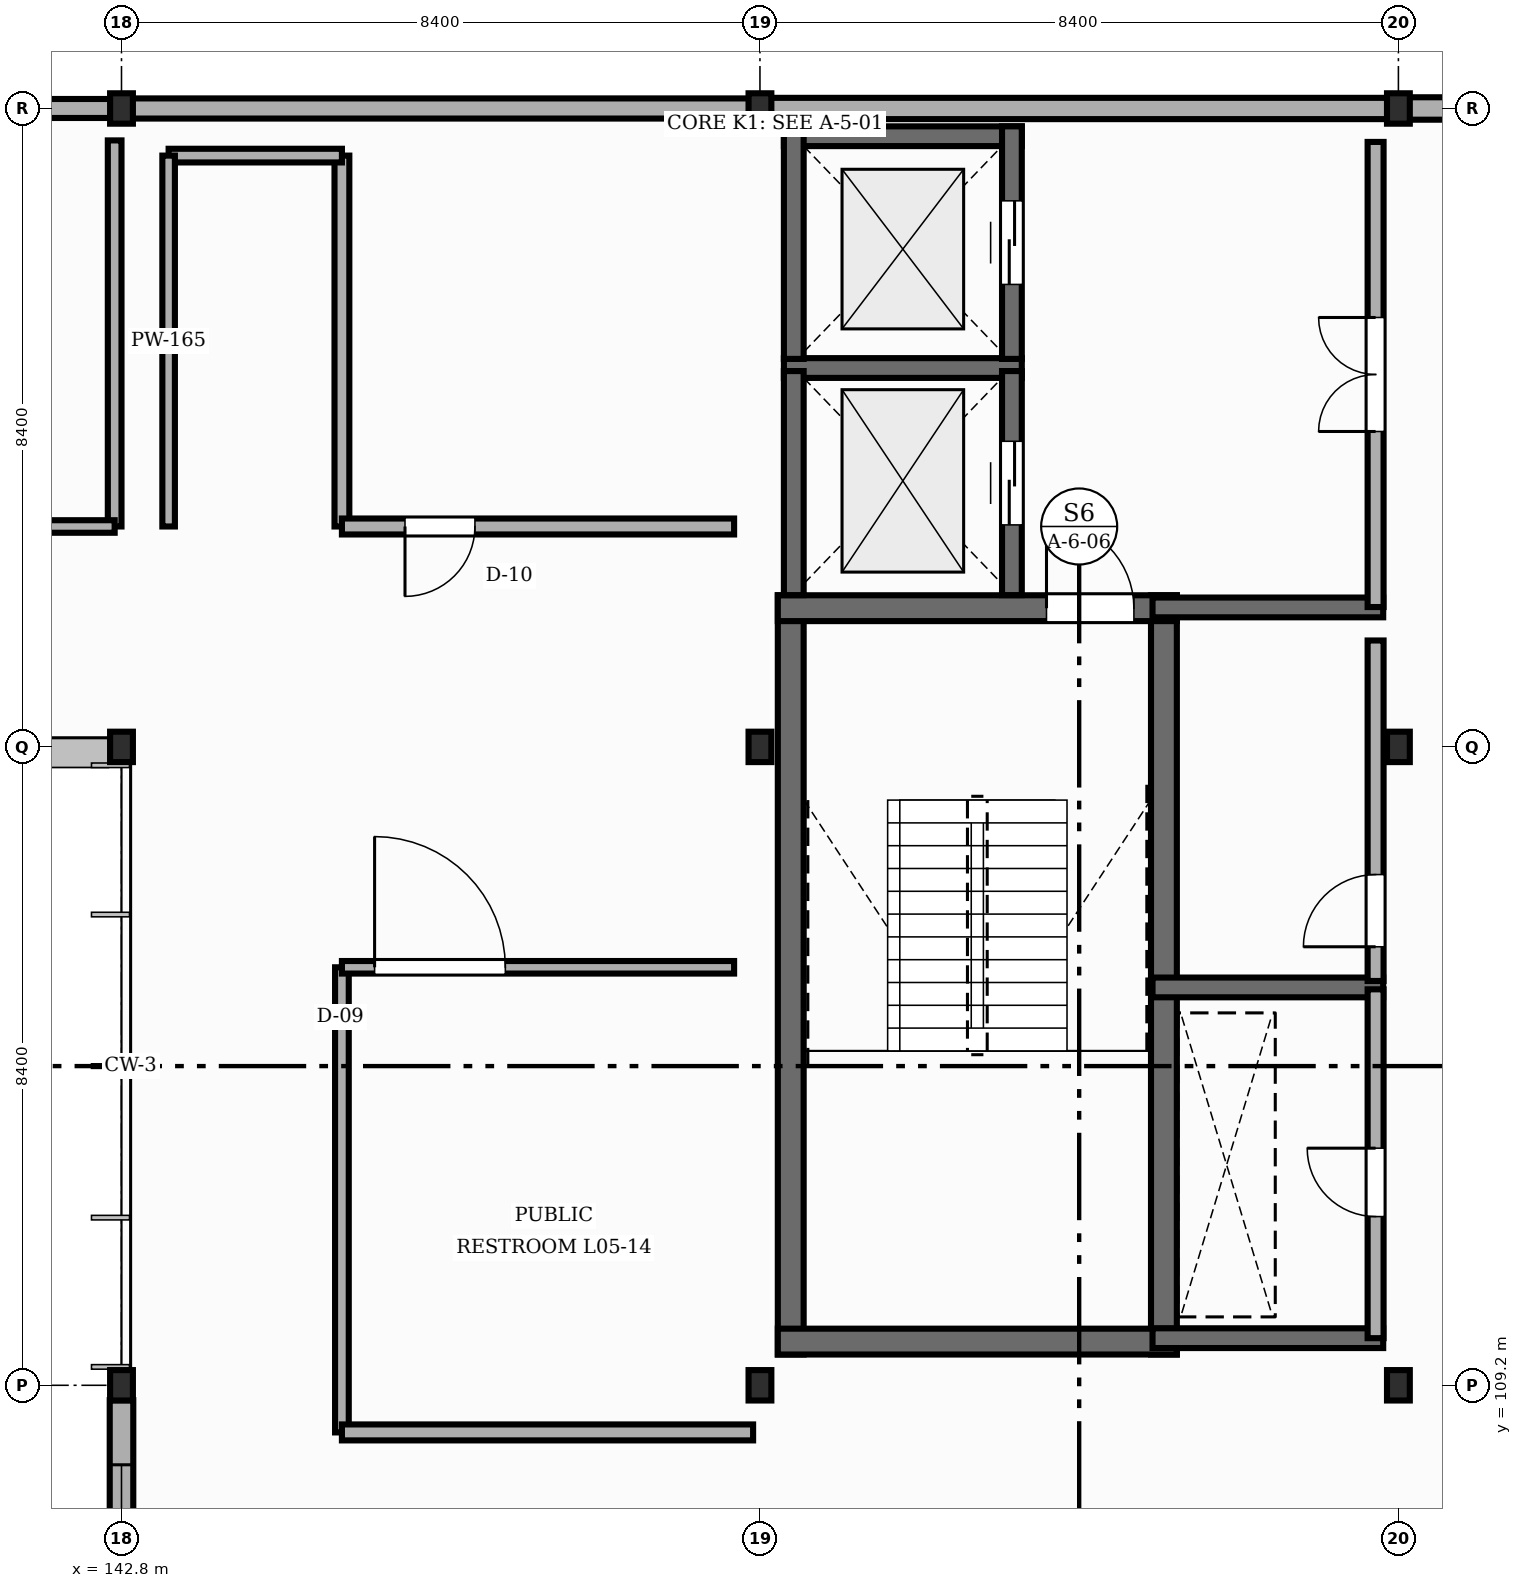
"""IFC4 building model, lengths in metres.
Left out: names, types, materials, properties, quantities, classifications, styles, units other than length and angle.
Written with IfcOpenShell. Run it as: python <this file> out.ifc"""

import sys

from ifc_helpers import new_model, si_unit, direction, frame, frame_2d, origin, origin_2d, place, context, subcontext, project, spatial, rectangle, i_section, extrude, element, fill, save


model = new_model("IFC4")
c1 = context("Model", 3, precision=1e-05, world=origin(), true_north=direction((0.0, 1.0)))
c2 = subcontext(c1, "Body", "Model", "MODEL_VIEW")
j1 = project(units=[si_unit("LENGTHUNIT", "METRE"), si_unit("PLANEANGLEUNIT", "RADIAN")], contexts=[c1])
p1 = place(None, origin())
s1 = spatial("IfcSite", under=j1, at=p1, CompositionType="ELEMENT")
p2 = place(p1, origin())
s2 = spatial("IfcBuilding", under=s1, at=p2, CompositionType="ELEMENT")
p3 = place(p2, frame((0.0, 0.0, 22.05)))
s3 = spatial("IfcBuildingStorey", under=s2, at=p3, CompositionType="ELEMENT", Elevation=22.05)
for number, where, z_axis, x_axis in (
    (1, (142.8, 109.2, 0.0), (0.0, 0.0, 1.0), (1.0, 0.0, 0.0)),
    (2, (142.8, 117.6, 0.0), (0.0, 0.0, 1.0), (1.0, 0.0, 0.0)),
    (3, (142.8, 126.0, 0.0), (0.0, 0.0, 1.0), (1.0, 0.0, 0.0)),
    (4, (151.2, 109.2, 0.0), (0.0, 0.0, 1.0), (1.0, 0.0, 0.0)),
    (5, (151.2, 117.6, 0.0), (0.0, 0.0, 1.0), (1.0, 0.0, 0.0)),
    (6, (151.2, 126.0, 0.0), (0.0, 0.0, 1.0), (1.0, 0.0, 0.0)),
    (7, (159.6, 109.2, 0.0), (0.0, 0.0, 1.0), (1.0, 0.0, 0.0)),
    (8, (159.6, 117.6, 0.0), (0.0, 0.0, 1.0), (1.0, 0.0, 0.0)),
    (9, (159.6, 126.0, 0.0), (0.0, 0.0, 1.0), (1.0, 0.0, 0.0)),
):
    element("IfcColumn", number, at=place(p3, frame(where, z_axis=z_axis, x_axis=x_axis)), inside=s3, PredefinedType="COLUMN", context=c2, shape_type="SweptSolid", body=[
        extrude(i_section(OverallWidth=0.3, OverallDepth=0.4, WebThickness=0.013, FlangeThickness=0.024, FilletRadius=0.027, at=origin_2d()), origin(), (0.0, 0.0, 1.0), 4.05),
    ])
p4 = place(p3, frame((167.992, 126.0, 0.0), z_axis=(0.0, 0.0, 1.0), x_axis=(-1.0, 0.0, 0.0)))
e10 = element("IfcWall", 10, at=p4, inside=s3, PredefinedType="STANDARD", context=c2, shape_type="SweptSolid", body=[
    extrude(rectangle(XDim=8.384, YDim=0.295, at=frame_2d((4.192, 0.0))), origin(), (0.0, 0.0, 1.0), 3.497),
])
p5 = place(p3, frame((159.592, 126.0, 0.0), z_axis=(0.0, 0.0, 1.0), x_axis=(-1.0, 0.0, 0.0)))
e11 = element("IfcWall", 11, at=p5, inside=s3, PredefinedType="STANDARD", context=c2, shape_type="SweptSolid", body=[
    extrude(rectangle(XDim=8.384, YDim=0.28, at=frame_2d((4.192, 0.0))), origin(), (0.0, 0.0, 1.0), 3.527),
])
p6 = place(p3, frame((151.192, 126.0, 0.0), z_axis=(0.0, 0.0, 1.0), x_axis=(-1.0, 0.0, 0.0)))
e12 = element("IfcWall", 12, at=p6, inside=s3, PredefinedType="STANDARD", context=c2, shape_type="SweptSolid", body=[
    extrude(rectangle(XDim=8.384, YDim=0.265, at=frame_2d((4.192, 0.0))), origin(), (0.0, 0.0, 1.0), 3.497),
])
p7 = place(p3, frame((142.792, 126.0, 0.0), z_axis=(0.0, 0.0, 1.0), x_axis=(-1.0, 0.0, 0.0)))
e13 = element("IfcWall", 13, at=p7, inside=s3, PredefinedType="STANDARD", context=c2, shape_type="SweptSolid", body=[
    extrude(rectangle(XDim=8.384, YDim=0.25, at=frame_2d((4.192, 0.0))), origin(), (0.0, 0.0, 1.0), 3.527),
])
p8 = place(p3, frame((142.8, 109.004, 0.0), z_axis=(0.0, 0.0, 1.0), x_axis=(0.0, -1.0, 0.0)))
e14 = element("IfcWall", 14, at=p8, inside=s3, PredefinedType="STANDARD", context=c2, shape_type="SweptSolid", body=[
    extrude(rectangle(XDim=8.008, YDim=0.31, at=frame_2d((4.004, 0.0))), origin(), (0.0, 0.0, 1.0), 3.587),
])
p9 = place(p8, frame((0.85, 0.0, 0.9)))
e15 = element("IfcOpeningElement", 15, at=p9, cuts=e14, PredefinedType="OPENING", context=c2, shape_type="SweptSolid", body=[
    extrude(rectangle(XDim=1.92, YDim=1.25, at=frame_2d((0.96, 0.625))), frame((0.0, 0.165, 0.0), z_axis=(0.0, -1.0, 0.0), x_axis=(1.0, 0.0, 0.0)), (0.0, 0.0, 1.0), 0.33),
])
p10 = place(p8, frame((6.138, 0.0, 0.9)))
e16 = element("IfcOpeningElement", 16, at=p10, cuts=e14, PredefinedType="OPENING", context=c2, shape_type="SweptSolid", body=[
    extrude(rectangle(XDim=1.02, YDim=1.45, at=frame_2d((0.51, 0.725))), frame((0.0, 0.165, 0.0), z_axis=(0.0, -1.0, 0.0), x_axis=(1.0, 0.0, 0.0)), (0.0, 0.0, 1.0), 0.33),
])
for number, where, z_axis, x_axis in (
    (17, (151.605, 109.605, 0.0), (0.0, 0.0, 1.0), (0.0, 1.0, 0.0)),
    (18, (156.515, 109.605, 0.0), (0.0, 0.0, 1.0), (0.0, 1.0, 0.0)),
):
    element("IfcWall", number, at=place(p3, frame(where, z_axis=z_axis, x_axis=x_axis)), inside=s3, PredefinedType="SHEAR", context=c2, shape_type="SweptSolid", body=[
        extrude(rectangle(XDim=9.99, YDim=0.34, at=frame_2d((4.995, 0.0))), origin(), (0.0, 0.0, 1.0), 3.85),
    ])
p11 = place(p3, frame((151.435, 109.775, 0.0), z_axis=(0.0, 0.0, 1.0), x_axis=(1.0, 0.0, 0.0)))
e19 = element("IfcWall", 19, at=p11, inside=s3, PredefinedType="SHEAR", context=c2, shape_type="SweptSolid", body=[
    extrude(rectangle(XDim=5.25, YDim=0.34, at=frame_2d((2.625, 0.0))), origin(), (0.0, 0.0, 1.0), 3.85),
])
p12 = place(p3, frame((151.435, 119.425, 0.0), z_axis=(0.0, 0.0, 1.0), x_axis=(1.0, 0.0, 0.0)))
e20 = element("IfcWall", 20, at=p12, inside=s3, PredefinedType="SHEAR", context=c2, shape_type="SweptSolid", body=[
    extrude(rectangle(XDim=5.25, YDim=0.34, at=frame_2d((2.625, 0.0))), origin(), (0.0, 0.0, 1.0), 3.85),
])
p13 = place(p12, frame((3.535, 0.0, 0.0)))
e21 = element("IfcOpeningElement", 21, at=p13, cuts=e20, PredefinedType="OPENING", context=c2, shape_type="SweptSolid", body=[
    extrude(rectangle(XDim=1.15, YDim=2.15, at=frame_2d((0.575, 1.075))), frame((0.0, 0.18, 0.0), z_axis=(0.0, -1.0, 0.0), x_axis=(1.0, 0.0, 0.0)), (0.0, 0.0, 1.0), 0.36),
])
p14 = place(p3, frame((151.515, 122.585, 0.0), z_axis=(0.0, 0.0, 1.0), x_axis=(1.0, 0.0, 0.0)))
e22 = element("IfcWall", 22, at=p14, inside=s3, PredefinedType="SHEAR", context=c2, shape_type="SweptSolid", body=[
    extrude(rectangle(XDim=3.13, YDim=0.26, at=frame_2d((1.565, 0.0))), origin(), (0.0, 0.0, 1.0), 3.85),
])
p15 = place(p3, frame((151.645, 119.597, 0.0), z_axis=(0.0, 0.0, 1.0), x_axis=(0.0, 1.0, 0.0)))
e23 = element("IfcWall", 23, at=p15, inside=s3, PredefinedType="SHEAR", context=c2, shape_type="SweptSolid", body=[
    extrude(rectangle(XDim=2.948, YDim=0.26, at=frame_2d((1.474, 0.0))), origin(), (0.0, 0.0, 1.0), 3.85),
])
p16 = place(p3, frame((154.515, 119.597, 0.0), z_axis=(0.0, 0.0, 1.0), x_axis=(0.0, 1.0, 0.0)))
e24 = element("IfcWall", 24, at=p16, inside=s3, PredefinedType="SHEAR", context=c2, shape_type="SweptSolid", body=[
    extrude(rectangle(XDim=2.948, YDim=0.26, at=frame_2d((1.474, 0.0))), origin(), (0.0, 0.0, 1.0), 3.85),
])
p17 = place(p16, frame((0.924, 0.0, 0.0)))
e25 = element("IfcOpeningElement", 25, at=p17, cuts=e24, PredefinedType="OPENING", context=c2, shape_type="SweptSolid", body=[
    extrude(rectangle(XDim=1.1, YDim=2.15, at=frame_2d((0.55, 1.075))), frame((0.0, 0.14, 0.0), z_axis=(0.0, -1.0, 0.0), x_axis=(1.0, 0.0, 0.0)), (0.0, 0.0, 1.0), 0.28),
])
p18 = place(p3, frame((151.515, 125.635, 0.0), z_axis=(0.0, 0.0, 1.0), x_axis=(1.0, 0.0, 0.0)))
e26 = element("IfcWall", 26, at=p18, inside=s3, PredefinedType="SHEAR", context=c2, shape_type="SweptSolid", body=[
    extrude(rectangle(XDim=3.13, YDim=0.26, at=frame_2d((1.565, 0.0))), origin(), (0.0, 0.0, 1.0), 3.85),
])
p19 = place(p3, frame((151.645, 122.705, 0.0), z_axis=(0.0, 0.0, 1.0), x_axis=(0.0, 1.0, 0.0)))
e27 = element("IfcWall", 27, at=p19, inside=s3, PredefinedType="SHEAR", context=c2, shape_type="SweptSolid", body=[
    extrude(rectangle(XDim=3.06, YDim=0.26, at=frame_2d((1.53, 0.0))), origin(), (0.0, 0.0, 1.0), 3.85),
])
p20 = place(p3, frame((154.515, 122.705, 0.0), z_axis=(0.0, 0.0, 1.0), x_axis=(0.0, 1.0, 0.0)))
e28 = element("IfcWall", 28, at=p20, inside=s3, PredefinedType="SHEAR", context=c2, shape_type="SweptSolid", body=[
    extrude(rectangle(XDim=3.06, YDim=0.26, at=frame_2d((1.53, 0.0))), origin(), (0.0, 0.0, 1.0), 3.85),
])
p21 = place(p20, frame((0.98, 0.0, 0.0)))
e29 = element("IfcOpeningElement", 29, at=p21, cuts=e28, PredefinedType="OPENING", context=c2, shape_type="SweptSolid", body=[
    extrude(rectangle(XDim=1.1, YDim=2.15, at=frame_2d((0.55, 1.075))), frame((0.0, 0.14, 0.0), z_axis=(0.0, -1.0, 0.0), x_axis=(1.0, 0.0, 0.0)), (0.0, 0.0, 1.0), 0.28),
])
for number, where, z_axis, x_axis in (
    (30, (156.365, 109.82, 0.0), (0.0, 0.0, 1.0), (1.0, 0.0, 0.0)),
    (31, (156.365, 114.435, 0.0), (0.0, 0.0, 1.0), (1.0, 0.0, 0.0)),
    (32, (156.365, 119.435, 0.0), (0.0, 0.0, 1.0), (1.0, 0.0, 0.0)),
):
    element("IfcWall", number, at=place(p3, frame(where, z_axis=z_axis, x_axis=x_axis)), inside=s3, PredefinedType="SHEAR", context=c2, shape_type="SweptSolid", body=[
        extrude(rectangle(XDim=3.035, YDim=0.26, at=frame_2d((1.518, 0.0))), origin(), (0.0, 0.0, 1.0), 3.85),
    ])
p22 = place(p3, frame((159.3, 109.82, 0.0), z_axis=(0.0, 0.0, 1.0), x_axis=(0.0, 1.0, 0.0)))
e33 = element("IfcWall", 33, at=p22, inside=s3, PredefinedType="STANDARD", context=c2, shape_type="SweptSolid", body=[
    extrude(rectangle(XDim=4.59, YDim=0.21, at=frame_2d((2.295, 0.0))), origin(), (0.0, 0.0, 1.0), 3.547),
])
p23 = place(p22, frame((1.6, 0.0, 0.0)))
e34 = element("IfcOpeningElement", 34, at=p23, cuts=e33, PredefinedType="OPENING", context=c2, shape_type="SweptSolid", body=[
    extrude(rectangle(XDim=0.9, YDim=2.1, at=frame_2d((0.45, 1.05))), frame((0.0, 0.115, 0.0), z_axis=(0.0, -1.0, 0.0), x_axis=(1.0, 0.0, 0.0)), (0.0, 0.0, 1.0), 0.23),
])
p24 = place(p3, frame((159.3, 114.52, 0.0), z_axis=(0.0, 0.0, 1.0), x_axis=(0.0, 1.0, 0.0)))
e35 = element("IfcWall", 35, at=p24, inside=s3, PredefinedType="STANDARD", context=c2, shape_type="SweptSolid", body=[
    extrude(rectangle(XDim=4.48, YDim=0.21, at=frame_2d((2.24, 0.0))), origin(), (0.0, 0.0, 1.0), 3.257),
])
p25 = place(p24, frame((0.45, 0.0, 0.0)))
e36 = element("IfcOpeningElement", 36, at=p25, cuts=e35, PredefinedType="OPENING", context=c2, shape_type="SweptSolid", body=[
    extrude(rectangle(XDim=0.95, YDim=2.15, at=frame_2d((0.475, 1.075))), frame((0.0, 0.115, 0.0), z_axis=(0.0, -1.0, 0.0), x_axis=(1.0, 0.0, 0.0)), (0.0, 0.0, 1.0), 0.23),
])
p26 = place(p3, frame((159.3, 119.44, 0.0), z_axis=(0.0, 0.0, 1.0), x_axis=(0.0, 1.0, 0.0)))
e37 = element("IfcWall", 37, at=p26, inside=s3, PredefinedType="STANDARD", context=c2, shape_type="SweptSolid", body=[
    extrude(rectangle(XDim=6.12, YDim=0.21, at=frame_2d((3.06, 0.0))), origin(), (0.0, 0.0, 1.0), 3.257),
])
p27 = place(p26, frame((2.31, 0.0, 0.0)))
e38 = element("IfcOpeningElement", 38, at=p27, cuts=e37, PredefinedType="OPENING", context=c2, shape_type="SweptSolid", body=[
    extrude(rectangle(XDim=1.5, YDim=2.2, at=frame_2d((0.75, 1.1))), frame((0.0, 0.115, 0.0), z_axis=(0.0, -1.0, 0.0), x_axis=(1.0, 0.0, 0.0)), (0.0, 0.0, 1.0), 0.23),
])
p28 = place(p3, frame((142.71, 125.58, -0.004), z_axis=(0.0, 0.0, 1.0), x_axis=(0.0, -1.0, 0.0)))
e39 = element("IfcWall", 39, at=p28, inside=s3, PredefinedType="STANDARD", context=c2, shape_type="SweptSolid", body=[
    extrude(rectangle(XDim=5.08, YDim=0.18, at=frame_2d((2.54, 0.0))), origin(), (0.0, 0.0, 1.0), 3.511),
])
p29 = place(p3, frame((142.71, 120.5, -0.004), z_axis=(0.0, 0.0, 1.0), x_axis=(-1.0, 0.0, 0.0)))
e40 = element("IfcWall", 40, at=p29, inside=s3, PredefinedType="STANDARD", context=c2, shape_type="SweptSolid", body=[
    extrude(rectangle(XDim=8.22, YDim=0.165, at=frame_2d((4.11, 0.0))), origin(), (0.0, 0.0, 1.0), 3.854),
])
p30 = place(p29, frame((3.56, 0.0, 0.0)))
e41 = element("IfcOpeningElement", 41, at=p30, cuts=e40, PredefinedType="OPENING", context=c2, shape_type="SweptSolid", body=[
    extrude(rectangle(XDim=1.1, YDim=2.06, at=frame_2d((0.55, 1.03))), frame((0.0, 0.093, 0.0), z_axis=(0.0, -1.0, 0.0), x_axis=(1.0, 0.0, 0.0)), (0.0, 0.0, 1.0), 0.185),
])
p31 = place(p3, frame((145.7, 108.58, -0.004), z_axis=(0.0, 0.0, 1.0), x_axis=(0.0, 1.0, 0.0)))
e42 = element("IfcWall", 42, at=p31, inside=s3, PredefinedType="STANDARD", context=c2, shape_type="SweptSolid", body=[
    extrude(rectangle(XDim=6.12, YDim=0.18, at=frame_2d((3.06, 0.0))), origin(), (0.0, 0.0, 1.0), 3.561),
])
p32 = place(p3, frame((145.7, 114.7, -0.004), z_axis=(0.0, 0.0, 1.0), x_axis=(1.0, 0.0, 0.0)))
e43 = element("IfcWall", 43, at=p32, inside=s3, PredefinedType="STANDARD", context=c2, shape_type="SweptSolid", body=[
    extrude(rectangle(XDim=5.16, YDim=0.165, at=frame_2d((2.58, 0.0))), origin(), (0.0, 0.0, 1.0), 3.854),
])
p33 = place(p32, frame((0.43, 0.0, 0.0)))
e44 = element("IfcOpeningElement", 44, at=p33, cuts=e43, PredefinedType="OPENING", context=c2, shape_type="SweptSolid", body=[
    extrude(rectangle(XDim=1.72, YDim=2.06, at=frame_2d((0.86, 1.03))), frame((0.0, 0.093, 0.0), z_axis=(0.0, -1.0, 0.0), x_axis=(1.0, 0.0, 0.0)), (0.0, 0.0, 1.0), 0.185),
])
p34 = place(p3, frame((151.11, 108.58, -0.004), z_axis=(0.0, 0.0, 1.0), x_axis=(-1.0, 0.0, 0.0)))
e45 = element("IfcWall", 45, at=p34, inside=s3, PredefinedType="STANDARD", context=c2, shape_type="SweptSolid", body=[
    extrude(rectangle(XDim=5.41, YDim=0.21, at=frame_2d((2.705, 0.0))), origin(), (0.0, 0.0, 1.0), 3.854),
])
p35 = place(p3, frame((145.7, 120.5, -0.004), z_axis=(0.0, 0.0, 1.0), x_axis=(0.0, 1.0, 0.0)))
e46 = element("IfcWall", 46, at=p35, inside=s3, PredefinedType="STANDARD", context=c2, shape_type="SweptSolid", body=[
    extrude(rectangle(XDim=4.88, YDim=0.195, at=frame_2d((2.44, 0.0))), origin(), (0.0, 0.0, 1.0), 3.621),
])
p36 = place(p3, frame((145.7, 125.38, -0.004), z_axis=(0.0, 0.0, 1.0), x_axis=(-1.0, 0.0, 0.0)))
e47 = element("IfcWall", 47, at=p36, inside=s3, PredefinedType="STANDARD", context=c2, shape_type="SweptSolid", body=[
    extrude(rectangle(XDim=2.28, YDim=0.18, at=frame_2d((1.14, 0.0))), origin(), (0.0, 0.0, 1.0), 3.854),
])
p37 = place(p3, frame((143.42, 125.38, -0.004), z_axis=(0.0, 0.0, 1.0), x_axis=(0.0, -1.0, 0.0)))
e48 = element("IfcWall", 48, at=p37, inside=s3, PredefinedType="STANDARD", context=c2, shape_type="SweptSolid", body=[
    extrude(rectangle(XDim=4.88, YDim=0.165, at=frame_2d((2.44, 0.0))), origin(), (0.0, 0.0, 1.0), 3.854),
])
p38 = place(p3, frame((150.86, 120.5, -0.004), z_axis=(0.0, 0.0, 1.0), x_axis=(-1.0, 0.0, 0.0)))
e49 = element("IfcWall", 49, at=p38, inside=s3, PredefinedType="STANDARD", context=c2, shape_type="SweptSolid", body=[
    extrude(rectangle(XDim=5.16, YDim=0.21, at=frame_2d((2.58, 0.0))), origin(), (0.0, 0.0, 1.0), 3.854),
])
p39 = place(p38, frame((3.41, 0.0, 0.0)))
e50 = element("IfcOpeningElement", 50, at=p39, cuts=e49, PredefinedType="OPENING", context=c2, shape_type="SweptSolid", body=[
    extrude(rectangle(XDim=0.92, YDim=2.14, at=frame_2d((0.46, 1.07))), frame((0.0, 0.115, 0.0), z_axis=(0.0, -1.0, 0.0), x_axis=(1.0, 0.0, 0.0)), (0.0, 0.0, 1.0), 0.23),
])
p40 = place(p9, origin())
e51 = element("IfcWindow", 51, at=p40, inside=s3, PartitioningType="SINGLE_PANEL", PredefinedType="WINDOW", context=c2, shape_type="SweptSolid", body=[
    extrude(rectangle(XDim=1.92, YDim=1.25, at=frame_2d((0.96, 0.625))), frame((0.0, 0.03, 0.0), z_axis=(0.0, -1.0, 0.0), x_axis=(1.0, 0.0, 0.0)), (0.0, 0.0, 1.0), 0.06),
])
fill(e15, e51)
p41 = place(p13, origin())
e52 = element("IfcDoor", 52, at=p41, inside=s3, OperationType="SINGLE_SWING_LEFT", PredefinedType="DOOR", context=c2, shape_type="SweptSolid", body=[
    extrude(rectangle(XDim=1.15, YDim=2.15, at=frame_2d((0.575, 1.075))), frame((0.0, 0.025, 0.0), z_axis=(0.0, -1.0, 0.0), x_axis=(1.0, 0.0, 0.0)), (0.0, 0.0, 1.0), 0.05),
])
fill(e21, e52)
p42 = place(p17, origin())
e53 = element("IfcDoor", 53, at=p42, inside=s3, OperationType="DOUBLE_DOOR_SLIDING", PredefinedType="DOOR", context=c2, shape_type="SweptSolid", body=[
    extrude(rectangle(XDim=1.1, YDim=2.15, at=frame_2d((0.55, 1.075))), frame((0.0, 0.025, 0.0), z_axis=(0.0, -1.0, 0.0), x_axis=(1.0, 0.0, 0.0)), (0.0, 0.0, 1.0), 0.05),
])
fill(e25, e53)
p43 = place(p21, origin())
e54 = element("IfcDoor", 54, at=p43, inside=s3, OperationType="DOUBLE_DOOR_SLIDING", PredefinedType="DOOR", context=c2, shape_type="SweptSolid", body=[
    extrude(rectangle(XDim=1.1, YDim=2.15, at=frame_2d((0.55, 1.075))), frame((0.0, 0.025, 0.0), z_axis=(0.0, -1.0, 0.0), x_axis=(1.0, 0.0, 0.0)), (0.0, 0.0, 1.0), 0.05),
])
fill(e29, e54)
p44 = place(p23, origin())
e55 = element("IfcDoor", 55, at=p44, inside=s3, OperationType="SINGLE_SWING_RIGHT", PredefinedType="DOOR", context=c2, shape_type="SweptSolid", body=[
    extrude(rectangle(XDim=0.9, YDim=2.1, at=frame_2d((0.45, 1.05))), frame((0.0, 0.025, 0.0), z_axis=(0.0, -1.0, 0.0), x_axis=(1.0, 0.0, 0.0)), (0.0, 0.0, 1.0), 0.05),
])
fill(e34, e55)
p45 = place(p25, origin())
e56 = element("IfcDoor", 56, at=p45, inside=s3, OperationType="SINGLE_SWING_LEFT", PredefinedType="DOOR", context=c2, shape_type="SweptSolid", body=[
    extrude(rectangle(XDim=0.95, YDim=2.15, at=frame_2d((0.475, 1.075))), frame((0.0, 0.025, 0.0), z_axis=(0.0, -1.0, 0.0), x_axis=(1.0, 0.0, 0.0)), (0.0, 0.0, 1.0), 0.05),
])
fill(e36, e56)
p46 = place(p27, origin())
e57 = element("IfcDoor", 57, at=p46, inside=s3, OperationType="DOUBLE_DOOR_SINGLE_SWING", PredefinedType="DOOR", context=c2, shape_type="SweptSolid", body=[
    extrude(rectangle(XDim=1.5, YDim=2.2, at=frame_2d((0.75, 1.1))), frame((0.0, 0.025, 0.0), z_axis=(0.0, -1.0, 0.0), x_axis=(1.0, 0.0, 0.0)), (0.0, 0.0, 1.0), 0.05),
])
fill(e38, e57)
p47 = place(p33, origin())
e58 = element("IfcDoor", 58, at=p47, inside=s3, OperationType="SINGLE_SWING_LEFT", PredefinedType="DOOR", context=c2, shape_type="SweptSolid", body=[
    extrude(rectangle(XDim=1.72, YDim=2.06, at=frame_2d((0.86, 1.03))), frame((0.0, 0.025, 0.0), z_axis=(0.0, -1.0, 0.0), x_axis=(1.0, 0.0, 0.0)), (0.0, 0.0, 1.0), 0.05),
])
fill(e44, e58)
p48 = place(p39, origin())
e59 = element("IfcDoor", 59, at=p48, inside=s3, OperationType="SINGLE_SWING_RIGHT", PredefinedType="DOOR", context=c2, shape_type="SweptSolid", body=[
    extrude(rectangle(XDim=0.92, YDim=2.14, at=frame_2d((0.46, 1.07))), frame((0.0, 0.025, 0.0), z_axis=(0.0, -1.0, 0.0), x_axis=(1.0, 0.0, 0.0)), (0.0, 0.0, 1.0), 0.05),
])
fill(e50, e59)
save(model, sys.argv[1])
